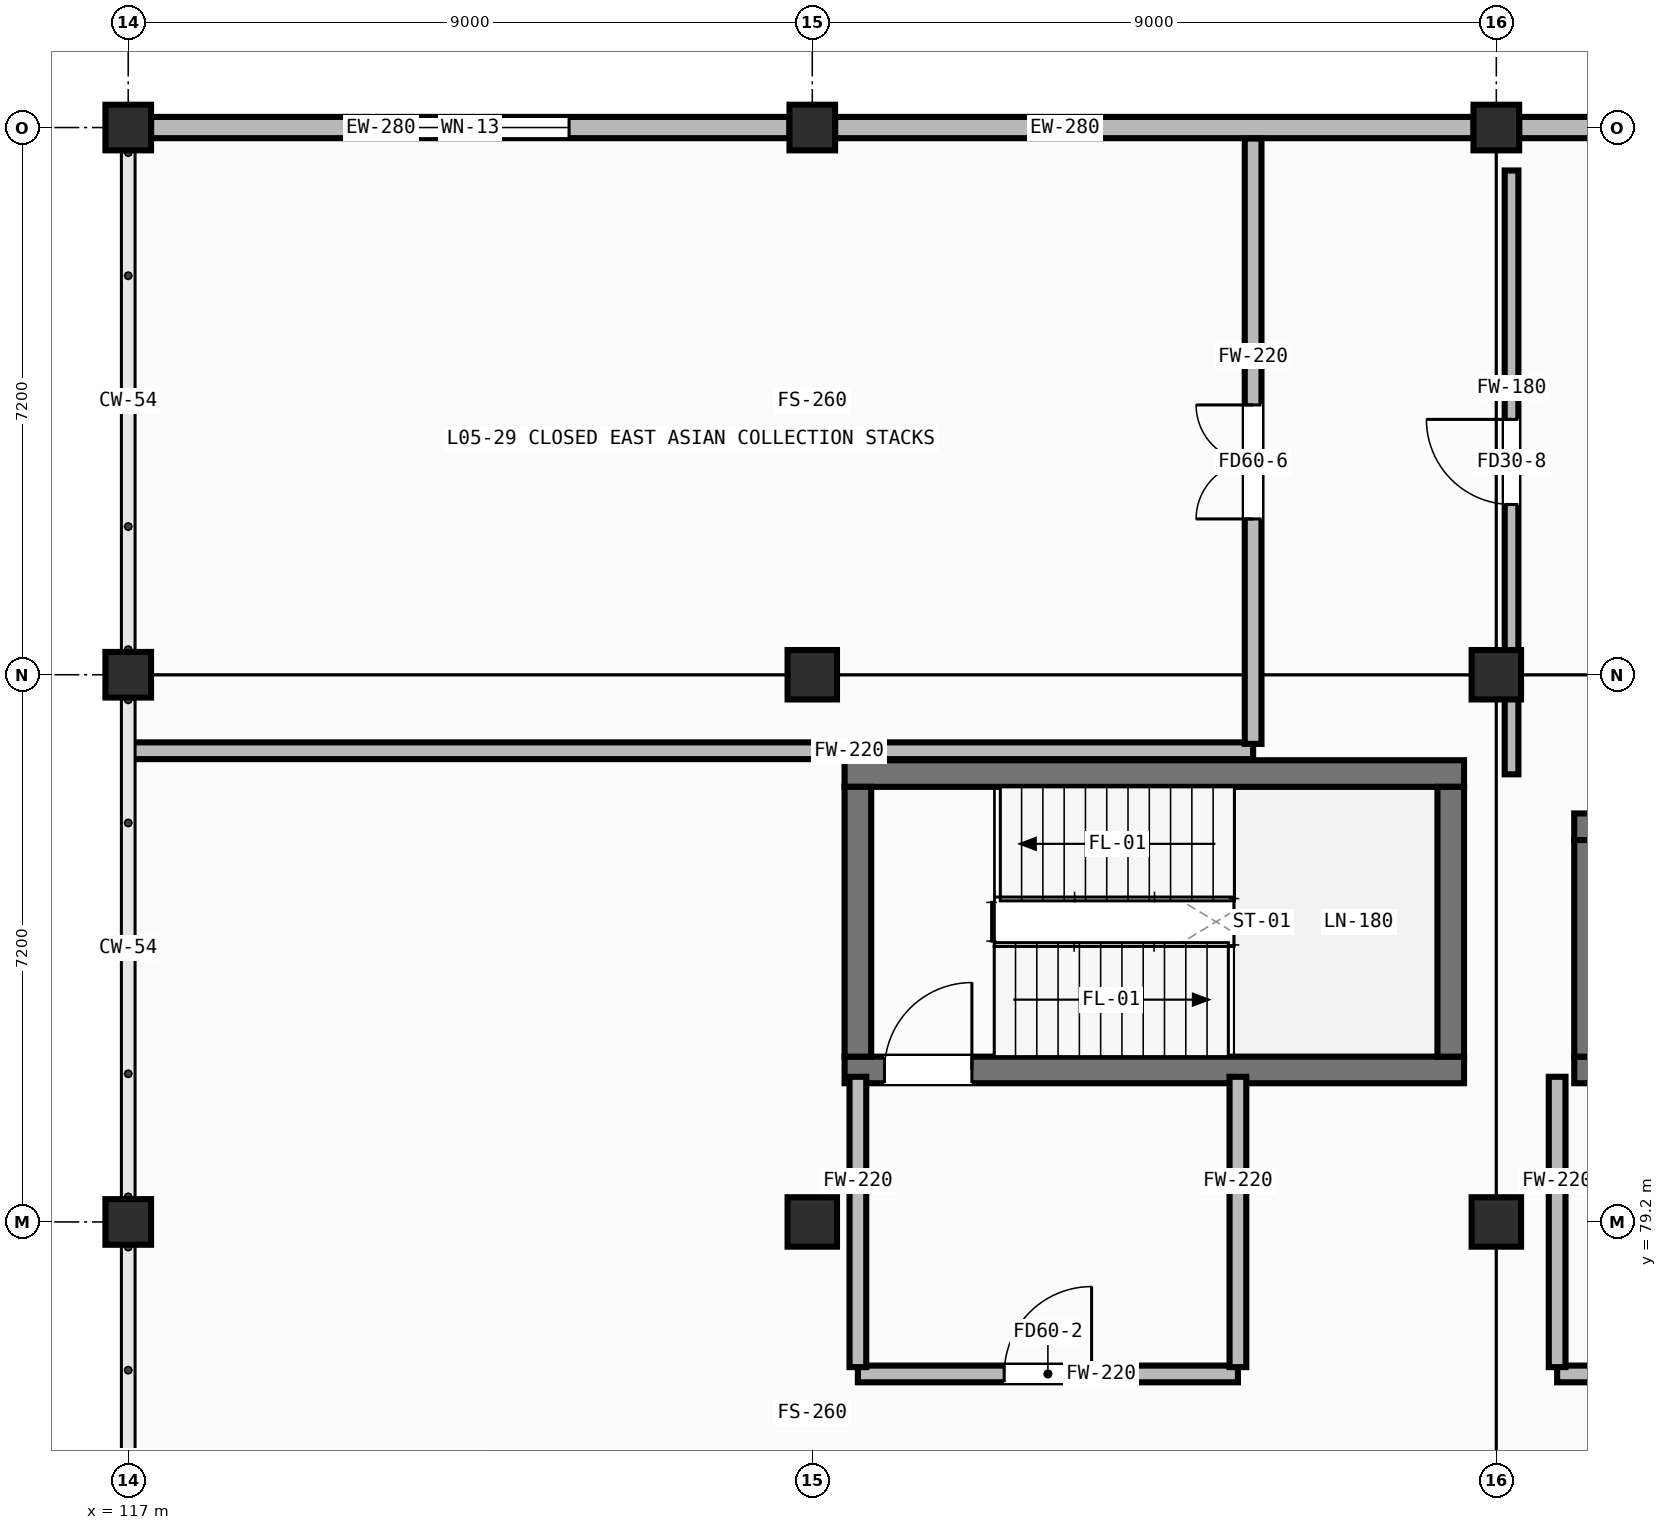
"""IFC4 building model, lengths in metres.
Left out: names, types, materials, properties, quantities, classifications, styles, units other than length and angle.
Written with IfcOpenShell. Run it as: python <this file> out.ifc"""

import sys

from ifc_helpers import new_model, si_unit, direction, frame, frame_2d, origin, origin_2d, place, context, subcontext, project, spatial, rectangle, hollow_rectangle, extrude, element, fill, save


model = new_model("IFC4")
c1 = context("Model", 3, precision=1e-05, world=origin(), true_north=direction((0.0, 1.0)))
c2 = subcontext(c1, "Body", "Model", "MODEL_VIEW")
j1 = project(units=[si_unit("LENGTHUNIT", "METRE"), si_unit("PLANEANGLEUNIT", "RADIAN")], contexts=[c1])
p1 = place(None, origin())
s1 = spatial("IfcSite", under=j1, at=p1, CompositionType="ELEMENT")
p2 = place(p1, origin())
s2 = spatial("IfcBuilding", under=s1, at=p2, CompositionType="ELEMENT")
p3 = place(p2, frame((0.0, 0.0, 17.0)))
s3 = spatial("IfcBuildingStorey", under=s2, at=p3, CompositionType="ELEMENT", Elevation=17.0)
for number, where, z_axis, x_axis in (
    (1, (117.0, 79.2, 0.0), (0.0, 0.0, 1.0), (1.0, 0.0, 0.0)),
    (2, (117.0, 86.4, 0.0), (0.0, 0.0, 1.0), (1.0, 0.0, 0.0)),
    (3, (117.0, 93.6, 0.0), (0.0, 0.0, 1.0), (1.0, 0.0, 0.0)),
):
    element("IfcColumn", number, at=place(p3, frame(where, z_axis=z_axis, x_axis=x_axis)), inside=s3, PredefinedType="COLUMN", context=c2, shape_type="SweptSolid", body=[
        extrude(hollow_rectangle(XDim=0.6, YDim=0.6, WallThickness=0.025, at=origin_2d()), origin(), (0.0, 0.0, 1.0), 3.6),
    ])
for number, where, z_axis, x_axis in (
    (4, (126.0, 79.2, 0.0), (0.0, 0.0, 1.0), (1.0, 0.0, 0.0)),
    (5, (126.0, 86.4, 0.0), (0.0, 0.0, 1.0), (1.0, 0.0, 0.0)),
):
    element("IfcColumn", number, at=place(p3, frame(where, z_axis=z_axis, x_axis=x_axis)), inside=s3, PredefinedType="COLUMN", context=c2, shape_type="SweptSolid", body=[
        extrude(hollow_rectangle(XDim=0.65, YDim=0.65, WallThickness=0.025, at=origin_2d()), origin(), (0.0, 0.0, 1.0), 3.6),
    ])
p4 = place(p3, frame((126.0, 93.6, 0.0), z_axis=(0.0, 0.0, 1.0), x_axis=(1.0, 0.0, 0.0)))
e6 = element("IfcColumn", 6, at=p4, inside=s3, PredefinedType="COLUMN", context=c2, shape_type="SweptSolid", body=[
    extrude(hollow_rectangle(XDim=0.6, YDim=0.6, WallThickness=0.025, at=origin_2d()), origin(), (0.0, 0.0, 1.0), 3.6),
])
for number, where, z_axis, x_axis in (
    (7, (135.0, 79.2, 0.0), (0.0, 0.0, 1.0), (1.0, 0.0, 0.0)),
    (8, (135.0, 86.4, 0.0), (0.0, 0.0, 1.0), (1.0, 0.0, 0.0)),
):
    element("IfcColumn", number, at=place(p3, frame(where, z_axis=z_axis, x_axis=x_axis)), inside=s3, PredefinedType="COLUMN", context=c2, shape_type="SweptSolid", body=[
        extrude(hollow_rectangle(XDim=0.65, YDim=0.65, WallThickness=0.025, at=origin_2d()), origin(), (0.0, 0.0, 1.0), 3.6),
    ])
p5 = place(p3, frame((135.0, 93.6, 0.0), z_axis=(0.0, 0.0, 1.0), x_axis=(1.0, 0.0, 0.0)))
e9 = element("IfcColumn", 9, at=p5, inside=s3, PredefinedType="COLUMN", context=c2, shape_type="SweptSolid", body=[
    extrude(hollow_rectangle(XDim=0.6, YDim=0.6, WallThickness=0.025, at=origin_2d()), origin(), (0.0, 0.0, 1.0), 3.6),
])
p6 = place(p3, frame((125.7, 93.6, 0.0), z_axis=(0.0, 0.0, 1.0), x_axis=(-1.0, 0.0, 0.0)))
e10 = element("IfcWall", 10, at=p6, inside=s3, PredefinedType="STANDARD", context=c2, shape_type="SweptSolid", body=[
    extrude(rectangle(XDim=8.4, YDim=0.28, at=frame_2d((4.2, 0.0))), origin(), (0.0, 0.0, 1.0), 2.95),
])
p7 = place(p6, frame((2.9, 0.0, 0.85)))
e11 = element("IfcOpeningElement", 11, at=p7, cuts=e10, PredefinedType="OPENING", context=c2, shape_type="SweptSolid", body=[
    extrude(rectangle(XDim=2.6, YDim=1.6, at=frame_2d((1.3, 0.8))), frame((0.0, 0.152, 0.0), z_axis=(0.0, -1.0, 0.0), x_axis=(1.0, 0.0, 0.0)), (0.0, 0.0, 1.0), 0.304),
])
p8 = place(p3, frame((134.7, 93.6, 0.0), z_axis=(0.0, 0.0, 1.0), x_axis=(-1.0, 0.0, 0.0)))
e12 = element("IfcWall", 12, at=p8, inside=s3, PredefinedType="STANDARD", context=c2, shape_type="SweptSolid", body=[
    extrude(rectangle(XDim=8.4, YDim=0.28, at=frame_2d((4.2, 0.0))), origin(), (0.0, 0.0, 1.0), 2.95),
])
p9 = place(p3, frame((143.7, 93.6, 0.0), z_axis=(0.0, 0.0, 1.0), x_axis=(-1.0, 0.0, 0.0)))
e13 = element("IfcWall", 13, at=p9, inside=s3, PredefinedType="STANDARD", context=c2, shape_type="SweptSolid", body=[
    extrude(rectangle(XDim=8.4, YDim=0.28, at=frame_2d((4.2, 0.0))), origin(), (0.0, 0.0, 1.0), 2.95),
])
p10 = place(p9, frame((2.9, 0.0, 0.85)))
e14 = element("IfcOpeningElement", 14, at=p10, cuts=e13, PredefinedType="OPENING", context=c2, shape_type="SweptSolid", body=[
    extrude(rectangle(XDim=2.6, YDim=1.6, at=frame_2d((1.3, 0.8))), frame((0.0, 0.152, 0.0), z_axis=(0.0, -1.0, 0.0), x_axis=(1.0, 0.0, 0.0)), (0.0, 0.0, 1.0), 0.304),
])
p11 = place(p3, frame((126.425, 81.2, 0.0), z_axis=(0.0, 0.0, 1.0), x_axis=(1.0, 0.0, 0.0)))
e15 = element("IfcWall", 15, at=p11, inside=s3, PredefinedType="SHEAR", context=c2, shape_type="SweptSolid", body=[
    extrude(rectangle(XDim=8.15, YDim=0.35, at=frame_2d((4.075, 0.0))), origin(), (0.0, 0.0, 1.0), 3.34),
])
p12 = place(p11, frame((0.525, 0.0, 0.0)))
e16 = element("IfcOpeningElement", 16, at=p12, cuts=e15, PredefinedType="OPENING", context=c2, shape_type="SweptSolid", body=[
    extrude(rectangle(XDim=1.15, YDim=2.1, at=frame_2d((0.575, 1.05))), frame((0.0, 0.187, 0.0), z_axis=(0.0, -1.0, 0.0), x_axis=(1.0, 0.0, 0.0)), (0.0, 0.0, 1.0), 0.374),
])
p13 = place(p3, frame((126.425, 85.1, 0.0), z_axis=(0.0, 0.0, 1.0), x_axis=(1.0, 0.0, 0.0)))
e17 = element("IfcWall", 17, at=p13, inside=s3, PredefinedType="SHEAR", context=c2, shape_type="SweptSolid", body=[
    extrude(rectangle(XDim=8.15, YDim=0.35, at=frame_2d((4.075, 0.0))), origin(), (0.0, 0.0, 1.0), 3.34),
])
for number, where, z_axis, x_axis in (
    (18, (126.6, 81.375, 0.0), (0.0, 0.0, 1.0), (0.0, 1.0, 0.0)),
    (19, (134.4, 81.375, 0.0), (0.0, 0.0, 1.0), (0.0, 1.0, 0.0)),
):
    element("IfcWall", number, at=place(p3, frame(where, z_axis=z_axis, x_axis=x_axis)), inside=s3, PredefinedType="SHEAR", context=c2, shape_type="SweptSolid", body=[
        extrude(rectangle(XDim=3.55, YDim=0.35, at=frame_2d((1.775, 0.0))), origin(), (0.0, 0.0, 1.0), 3.34),
    ])
p14 = place(p3, frame((136.025, 81.2, 0.0), z_axis=(0.0, 0.0, 1.0), x_axis=(1.0, 0.0, 0.0)))
e20 = element("IfcWall", 20, at=p14, inside=s3, PredefinedType="SHEAR", context=c2, shape_type="SweptSolid", body=[
    extrude(rectangle(XDim=2.75, YDim=0.35, at=frame_2d((1.375, 0.0))), origin(), (0.0, 0.0, 1.0), 3.34),
])
p15 = place(p14, frame((0.8, 0.0, 0.0)))
e21 = element("IfcOpeningElement", 21, at=p15, cuts=e20, PredefinedType="OPENING", context=c2, shape_type="SweptSolid", body=[
    extrude(rectangle(XDim=1.15, YDim=2.12, at=frame_2d((0.575, 1.06))), frame((0.0, 0.187, 0.0), z_axis=(0.0, -1.0, 0.0), x_axis=(1.0, 0.0, 0.0)), (0.0, 0.0, 1.0), 0.374),
])
p16 = place(p3, frame((136.025, 84.4, 0.0), z_axis=(0.0, 0.0, 1.0), x_axis=(1.0, 0.0, 0.0)))
e22 = element("IfcWall", 22, at=p16, inside=s3, PredefinedType="SHEAR", context=c2, shape_type="SweptSolid", body=[
    extrude(rectangle(XDim=2.75, YDim=0.35, at=frame_2d((1.375, 0.0))), origin(), (0.0, 0.0, 1.0), 3.34),
])
p17 = place(p3, frame((136.2, 81.375, 0.0), z_axis=(0.0, 0.0, 1.0), x_axis=(0.0, 1.0, 0.0)))
e23 = element("IfcWall", 23, at=p17, inside=s3, PredefinedType="SHEAR", context=c2, shape_type="SweptSolid", body=[
    extrude(rectangle(XDim=2.85, YDim=0.35, at=frame_2d((1.425, 0.0))), origin(), (0.0, 0.0, 1.0), 3.34),
])
p18 = place(p3, frame((126.6, 77.2, 0.0), z_axis=(0.0, 0.0, 1.0), x_axis=(1.0, 0.0, 0.0)))
e24 = element("IfcWall", 24, at=p18, inside=s3, PredefinedType="PARTITIONING", context=c2, shape_type="SweptSolid", body=[
    extrude(rectangle(XDim=5.0, YDim=0.22, at=frame_2d((2.5, 0.0))), origin(), (0.0, 0.0, 1.0), 3.34),
])
p19 = place(p18, frame((1.925, 0.0, 0.0)))
e25 = element("IfcOpeningElement", 25, at=p19, cuts=e24, PredefinedType="OPENING", context=c2, shape_type="SweptSolid", body=[
    extrude(rectangle(XDim=1.15, YDim=2.1, at=frame_2d((0.575, 1.05))), frame((0.0, 0.122, 0.0), z_axis=(0.0, -1.0, 0.0), x_axis=(1.0, 0.0, 0.0)), (0.0, 0.0, 1.0), 0.244),
])
for number, where, z_axis, x_axis in (
    (26, (126.6, 77.29, 0.0), (0.0, 0.0, 1.0), (0.0, 1.0, 0.0)),
    (27, (131.6, 77.29, 0.0), (0.0, 0.0, 1.0), (0.0, 1.0, 0.0)),
):
    element("IfcWall", number, at=place(p3, frame(where, z_axis=z_axis, x_axis=x_axis)), inside=s3, PredefinedType="PARTITIONING", context=c2, shape_type="SweptSolid", body=[
        extrude(rectangle(XDim=3.82, YDim=0.22, at=frame_2d((1.91, 0.0))), origin(), (0.0, 0.0, 1.0), 3.34),
    ])
p20 = place(p3, frame((135.8, 77.2, 0.0), z_axis=(0.0, 0.0, 1.0), x_axis=(1.0, 0.0, 0.0)))
e28 = element("IfcWall", 28, at=p20, inside=s3, PredefinedType="PARTITIONING", context=c2, shape_type="SweptSolid", body=[
    extrude(rectangle(XDim=7.8, YDim=0.22, at=frame_2d((3.9, 0.0))), origin(), (0.0, 0.0, 1.0), 3.34),
])
p21 = place(p20, frame((3.175, 0.0, 0.0)))
e29 = element("IfcOpeningElement", 29, at=p21, cuts=e28, PredefinedType="OPENING", context=c2, shape_type="SweptSolid", body=[
    extrude(rectangle(XDim=1.05, YDim=2.02, at=frame_2d((0.525, 1.01))), frame((0.0, 0.122, 0.0), z_axis=(0.0, -1.0, 0.0), x_axis=(1.0, 0.0, 0.0)), (0.0, 0.0, 1.0), 0.244),
])
p22 = place(p3, frame((135.8, 77.29, 0.0), z_axis=(0.0, 0.0, 1.0), x_axis=(0.0, 1.0, 0.0)))
e30 = element("IfcWall", 30, at=p22, inside=s3, PredefinedType="PARTITIONING", context=c2, shape_type="SweptSolid", body=[
    extrude(rectangle(XDim=3.82, YDim=0.22, at=frame_2d((1.91, 0.0))), origin(), (0.0, 0.0, 1.0), 3.34),
])
p23 = place(p3, frame((117.035, 85.4, 0.0), z_axis=(0.0, 0.0, 1.0), x_axis=(1.0, 0.0, 0.0)))
e31 = element("IfcWall", 31, at=p23, inside=s3, PredefinedType="PARTITIONING", context=c2, shape_type="SweptSolid", body=[
    extrude(rectangle(XDim=14.765, YDim=0.22, at=frame_2d((7.383, 0.0))), origin(), (0.0, 0.0, 1.0), 3.34),
])
p24 = place(p3, frame((131.8, 85.49, 0.0), z_axis=(0.0, 0.0, 1.0), x_axis=(0.0, 1.0, 0.0)))
e32 = element("IfcWall", 32, at=p24, inside=s3, PredefinedType="PARTITIONING", context=c2, shape_type="SweptSolid", body=[
    extrude(rectangle(XDim=7.965, YDim=0.22, at=frame_2d((3.982, 0.0))), origin(), (0.0, 0.0, 1.0), 3.34),
])
p25 = place(p24, frame((2.96, 0.0, 0.0)))
e33 = element("IfcOpeningElement", 33, at=p25, cuts=e32, PredefinedType="OPENING", context=c2, shape_type="SweptSolid", body=[
    extrude(rectangle(XDim=1.5, YDim=2.1, at=frame_2d((0.75, 1.05))), frame((0.0, 0.122, 0.0), z_axis=(0.0, -1.0, 0.0), x_axis=(1.0, 0.0, 0.0)), (0.0, 0.0, 1.0), 0.244),
])
p26 = place(p3, frame((135.2, 85.09, 0.0), z_axis=(0.0, 0.0, 1.0), x_axis=(0.0, 1.0, 0.0)))
e34 = element("IfcWall", 34, at=p26, inside=s3, PredefinedType="PARTITIONING", context=c2, shape_type="SweptSolid", body=[
    extrude(rectangle(XDim=7.945, YDim=0.18, at=frame_2d((3.972, 0.0))), origin(), (0.0, 0.0, 1.0), 2.62),
])
p27 = place(p26, frame((3.55, 0.0, 0.0)))
e35 = element("IfcOpeningElement", 35, at=p27, cuts=e34, PredefinedType="OPENING", context=c2, shape_type="SweptSolid", body=[
    extrude(rectangle(XDim=1.12, YDim=2.08, at=frame_2d((0.56, 1.04))), frame((0.0, 0.102, 0.0), z_axis=(0.0, -1.0, 0.0), x_axis=(1.0, 0.0, 0.0)), (0.0, 0.0, 1.0), 0.204),
])
p28 = place(p7, origin())
e36 = element("IfcWindow", 36, at=p28, inside=s3, PartitioningType="DOUBLE_PANEL_VERTICAL", PredefinedType="WINDOW", context=c2, shape_type="SweptSolid", body=[
    extrude(rectangle(XDim=2.6, YDim=1.6, at=frame_2d((1.3, 0.8))), frame((0.0, 0.03, 0.0), z_axis=(0.0, -1.0, 0.0), x_axis=(1.0, 0.0, 0.0)), (0.0, 0.0, 1.0), 0.06),
])
fill(e11, e36)
p29 = place(p12, origin())
e37 = element("IfcDoor", 37, at=p29, inside=s3, OperationType="SINGLE_SWING_RIGHT", PredefinedType="DOOR", context=c2, shape_type="SweptSolid", body=[
    extrude(rectangle(XDim=1.15, YDim=2.1, at=frame_2d((0.575, 1.05))), frame((0.0, 0.025, 0.0), z_axis=(0.0, -1.0, 0.0), x_axis=(1.0, 0.0, 0.0)), (0.0, 0.0, 1.0), 0.05),
])
fill(e16, e37)
p30 = place(p19, origin())
e38 = element("IfcDoor", 38, at=p30, inside=s3, OperationType="SINGLE_SWING_RIGHT", PredefinedType="DOOR", context=c2, shape_type="SweptSolid", body=[
    extrude(rectangle(XDim=1.15, YDim=2.1, at=frame_2d((0.575, 1.05))), frame((0.0, 0.025, 0.0), z_axis=(0.0, -1.0, 0.0), x_axis=(1.0, 0.0, 0.0)), (0.0, 0.0, 1.0), 0.05),
])
fill(e25, e38)
p31 = place(p25, origin())
e39 = element("IfcDoor", 39, at=p31, inside=s3, OperationType="DOUBLE_DOOR_SINGLE_SWING", PredefinedType="DOOR", context=c2, shape_type="SweptSolid", body=[
    extrude(rectangle(XDim=1.5, YDim=2.1, at=frame_2d((0.75, 1.05))), frame((0.0, 0.025, 0.0), z_axis=(0.0, -1.0, 0.0), x_axis=(1.0, 0.0, 0.0)), (0.0, 0.0, 1.0), 0.05),
])
fill(e33, e39)
p32 = place(p27, origin())
e40 = element("IfcDoor", 40, at=p32, inside=s3, OperationType="SINGLE_SWING_RIGHT", PredefinedType="DOOR", context=c2, shape_type="SweptSolid", body=[
    extrude(rectangle(XDim=1.12, YDim=2.08, at=frame_2d((0.56, 1.04))), frame((0.0, 0.025, 0.0), z_axis=(0.0, -1.0, 0.0), x_axis=(1.0, 0.0, 0.0)), (0.0, 0.0, 1.0), 0.05),
])
fill(e35, e40)
save(model, sys.argv[1])
